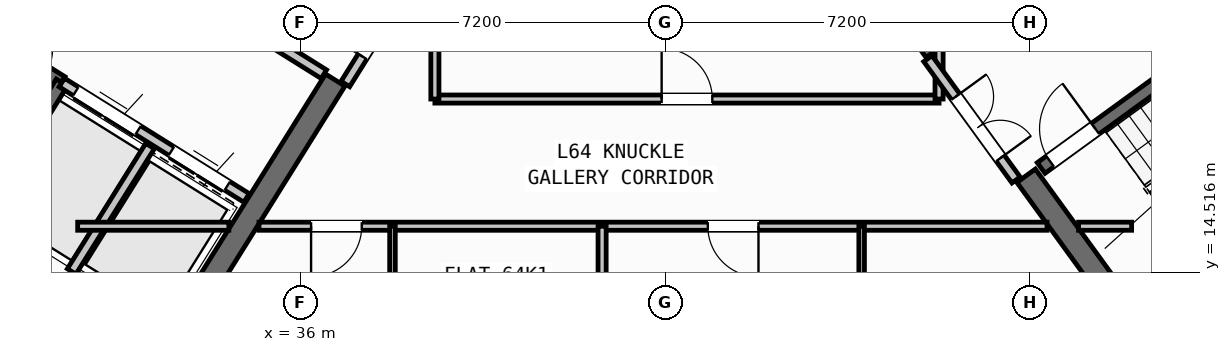
"""IFC4 building model, lengths in metres.
Left out: names, types, materials, properties, quantities, classifications, styles, units other than length and angle.
Written with IfcOpenShell. Run it as: python <this file> out.ifc"""

import sys

from ifc_helpers import new_model, si_unit, direction, frame, frame_2d, origin, place, context, subcontext, project, spatial, rectangle, extrude, source, transform, mapped, element, fill, save


model = new_model("IFC4")
c1 = context("Model", 3, precision=1e-05, world=origin(), true_north=direction((0.0, 1.0)))
c2 = subcontext(c1, "Body", "Model", "MODEL_VIEW")
j1 = project(units=[si_unit("LENGTHUNIT", "METRE"), si_unit("PLANEANGLEUNIT", "RADIAN")], contexts=[c1])
p1 = place(None, origin())
s1 = spatial("IfcSite", under=j1, at=p1, CompositionType="ELEMENT")
p2 = place(p1, origin())
s2 = spatial("IfcBuilding", under=s1, at=p2, CompositionType="ELEMENT")
p3 = place(p2, frame((0.0, 0.0, 254.7)))
s3 = spatial("IfcBuildingStorey", under=s2, at=p3, CompositionType="ELEMENT", Elevation=254.7)
p4 = place(p3, frame((33.324, 12.503, 0.0), z_axis=(0.0, 0.0, 1.0), x_axis=(-0.848043529849, 0.529926571782, 0.0)))
e1 = element("IfcWall", 1, at=p4, inside=s3, PredefinedType="SHEAR", context=c2, shape_type="SweptSolid", body=[
    extrude(rectangle(XDim=13.04, YDim=0.45, at=frame_2d((6.52, 0.0))), origin(), (0.0, 0.0, 1.0), 4.25),
])
p5 = place(p3, frame((36.683, 18.304, 0.0), z_axis=(0.0, 0.0, 1.0), x_axis=(-0.529904039071, -0.848057609704, 0.0)))
e2 = element("IfcWall", 2, at=p5, inside=s3, PredefinedType="SHEAR", context=c2, shape_type="SweptSolid", body=[
    extrude(rectangle(XDim=6.475, YDim=0.45, at=frame_2d((3.238, 0.0))), origin(), (0.0, 0.0, 1.0), 4.25),
])
p6 = place(p3, frame((52.399, 13.169, 0.0), z_axis=(0.0, 0.0, 1.0), x_axis=(0.809022352778, 0.587777877013, 0.0)))
e3 = element("IfcWall", 3, at=p6, inside=s3, PredefinedType="SHEAR", context=c2, shape_type="SweptSolid", body=[
    extrude(rectangle(XDim=12.24, YDim=0.45, at=frame_2d((6.12, 0.0))), origin(), (0.0, 0.0, 1.0), 4.25),
])
p7 = place(p3, frame((52.449, 13.483, 0.0), z_axis=(0.0, 0.0, 1.0), x_axis=(-0.587819244441, 0.808992296542, 0.0)))
e4 = element("IfcWall", 4, at=p7, inside=s3, PredefinedType="SHEAR", context=c2, shape_type="SweptSolid", body=[
    extrude(rectangle(XDim=3.625, YDim=0.45, at=frame_2d((1.812, 0.0))), origin(), (0.0, 0.0, 1.0), 4.25),
])
p8 = place(p3, frame((48.526, 18.884, 0.0), z_axis=(0.0, 0.0, 1.0), x_axis=(-0.587774812919, 0.809024578921, 0.0)))
e5 = element("IfcWall", 5, at=p8, inside=s3, PredefinedType="SHEAR", context=c2, shape_type="SweptSolid", body=[
    extrude(rectangle(XDim=6.475, YDim=0.45, at=frame_2d((3.238, 0.0))), origin(), (0.0, 0.0, 1.0), 4.25),
])
p9 = place(p3, frame((31.28, 18.261, 0.0), z_axis=(0.0, 0.0, 1.0), x_axis=(-0.848051618787, 0.529913626805, 0.0)))
e6 = element("IfcWall", 6, at=p9, inside=s3, PredefinedType="SHEAR", context=c2, shape_type="SweptSolid", body=[
    extrude(rectangle(XDim=7.46, YDim=0.26, at=frame_2d((3.73, 0.0))), origin(), (0.0, 0.0, 1.0), 4.25),
])
p10 = place(p9, frame((0.36, 0.0, 0.0)))
e7 = element("IfcOpeningElement", 7, at=p10, cuts=e6, PredefinedType="OPENING", context=c2, shape_type="SweptSolid", body=[
    extrude(rectangle(XDim=0.86, YDim=2.05, at=frame_2d((0.43, 1.025))), frame((0.0, 0.14, 0.0), z_axis=(0.0, -1.0, 0.0), x_axis=(1.0, 0.0, 0.0)), (0.0, 0.0, 1.0), 0.28),
])
p11 = place(p3, frame((31.288, 18.256, 0.0), z_axis=(0.0, 0.0, 1.0), x_axis=(-0.529943379326, -0.848033026897, 0.0)))
e8 = element("IfcWall", 8, at=p11, inside=s3, PredefinedType="SHEAR", context=c2, shape_type="SweptSolid", body=[
    extrude(rectangle(XDim=3.16, YDim=0.26, at=frame_2d((1.58, 0.0))), origin(), (0.0, 0.0, 1.0), 4.25),
])
p12 = place(p3, frame((34.933, 15.978, 0.0), z_axis=(0.0, 0.0, 1.0), x_axis=(-0.848055739377, 0.529907032327, 0.0)))
e9 = element("IfcWall", 9, at=p12, inside=s3, PredefinedType="STANDARD", context=c2, shape_type="SweptSolid", body=[
    extrude(rectangle(XDim=4.298, YDim=0.2, at=frame_2d((2.149, 0.0))), origin(), (0.0, 0.0, 1.0), 4.24),
])
p13 = place(p12, frame((0.448, 0.0, 0.0)))
e10 = element("IfcOpeningElement", 10, at=p13, cuts=e9, PredefinedType="OPENING", context=c2, shape_type="SweptSolid", body=[
    extrude(rectangle(XDim=1.3, YDim=2.2, at=frame_2d((0.65, 1.1))), frame((0.0, 0.11, 0.0), z_axis=(0.0, -1.0, 0.0), x_axis=(1.0, 0.0, 0.0)), (0.0, 0.0, 1.0), 0.22),
])
p14 = place(p12, frame((2.523, 0.0, 0.0)))
e11 = element("IfcOpeningElement", 11, at=p14, cuts=e9, PredefinedType="OPENING", context=c2, shape_type="SweptSolid", body=[
    extrude(rectangle(XDim=1.45, YDim=2.25, at=frame_2d((0.725, 1.125))), frame((0.0, 0.11, 0.0), z_axis=(0.0, -1.0, 0.0), x_axis=(1.0, 0.0, 0.0)), (0.0, 0.0, 1.0), 0.22),
])
p15 = place(p3, frame((36.459, 18.421, 0.0), z_axis=(0.0, 0.0, 1.0), x_axis=(-0.848059591691, 0.529900867089, 0.0)))
e12 = element("IfcWall", 12, at=p15, inside=s3, PredefinedType="STANDARD", context=c2, shape_type="SweptSolid", body=[
    extrude(rectangle(XDim=5.818, YDim=0.2, at=frame_2d((2.909, 0.0))), origin(), (0.0, 0.0, 1.0), 4.24),
])
p16 = place(p15, frame((2.598, 0.0, 0.0)))
e13 = element("IfcOpeningElement", 13, at=p16, cuts=e12, PredefinedType="OPENING", context=c2, shape_type="SweptSolid", body=[
    extrude(rectangle(XDim=1.15, YDim=2.1, at=frame_2d((0.575, 1.05))), frame((0.0, 0.11, 0.0), z_axis=(0.0, -1.0, 0.0), x_axis=(1.0, 0.0, 0.0)), (0.0, 0.0, 1.0), 0.22),
])
p17 = place(p3, frame((33.029, 17.003, 0.0), z_axis=(0.0, 0.0, 1.0), x_axis=(-0.529916267533, -0.848049968695, 0.0)))
e14 = element("IfcWall", 14, at=p17, inside=s3, PredefinedType="STANDARD", context=c2, shape_type="SweptSolid", body=[
    extrude(rectangle(XDim=2.92, YDim=0.2, at=frame_2d((1.46, 0.0))), origin(), (0.0, 0.0, 1.0), 4.24),
])
p18 = place(p3, frame((52.472, 14.013, 0.0), z_axis=(0.0, 0.0, 1.0), x_axis=(0.809028366311, 0.587769599847, 0.0)))
e15 = element("IfcWall", 15, at=p18, inside=s3, PredefinedType="SHEAR", context=c2, shape_type="SweptSolid", body=[
    extrude(rectangle(XDim=7.33, YDim=0.26, at=frame_2d((3.665, 0.0))), origin(), (0.0, 0.0, 1.0), 4.25),
])
p19 = place(p3, frame((50.615, 16.57, 0.0), z_axis=(0.0, 0.0, 1.0), x_axis=(0.809028366311, 0.587769599847, 0.0)))
e16 = element("IfcWall", 16, at=p19, inside=s3, PredefinedType="SHEAR", context=c2, shape_type="SweptSolid", body=[
    extrude(rectangle(XDim=7.33, YDim=0.26, at=frame_2d((3.665, 0.0))), origin(), (0.0, 0.0, 1.0), 4.25),
])
p20 = place(p19, frame((0.22, 0.0, 0.0)))
e17 = element("IfcOpeningElement", 17, at=p20, cuts=e16, PredefinedType="OPENING", context=c2, shape_type="SweptSolid", body=[
    extrude(rectangle(XDim=1.1, YDim=2.1, at=frame_2d((0.55, 1.05))), frame((0.0, 0.14, 0.0), z_axis=(0.0, -1.0, 0.0), x_axis=(1.0, 0.0, 0.0)), (0.0, 0.0, 1.0), 0.28),
])
p21 = place(p3, frame((32.164, 10.374, 0.0), z_axis=(0.0, 0.0, 1.0), x_axis=(-0.848044107957, 0.529925646633, 0.0)))
e18 = element("IfcWall", 18, at=p21, inside=s3, PredefinedType="PARTITIONING", context=c2, shape_type="SweptSolid", body=[
    extrude(rectangle(XDim=15.57, YDim=0.16, at=frame_2d((7.785, 0.0))), origin(), (0.0, 0.0, 1.0), 4.24),
])
p22 = place(p21, frame((0.85, 0.0, 0.0)))
e19 = element("IfcOpeningElement", 19, at=p22, cuts=e18, PredefinedType="OPENING", context=c2, shape_type="SweptSolid", body=[
    extrude(rectangle(XDim=0.86, YDim=2.05, at=frame_2d((0.43, 1.025))), frame((0.0, 0.09, 0.0), z_axis=(0.0, -1.0, 0.0), x_axis=(1.0, 0.0, 0.0)), (0.0, 0.0, 1.0), 0.18),
])
p23 = place(p21, frame((3.87, 0.0, 0.0)))
e20 = element("IfcOpeningElement", 20, at=p23, cuts=e18, PredefinedType="OPENING", context=c2, shape_type="SweptSolid", body=[
    extrude(rectangle(XDim=0.86, YDim=2.05, at=frame_2d((0.43, 1.025))), frame((0.0, 0.09, 0.0), z_axis=(0.0, -1.0, 0.0), x_axis=(1.0, 0.0, 0.0)), (0.0, 0.0, 1.0), 0.18),
])
p24 = place(p21, frame((6.33, 0.0, 0.0)))
e21 = element("IfcOpeningElement", 21, at=p24, cuts=e18, PredefinedType="OPENING", context=c2, shape_type="SweptSolid", body=[
    extrude(rectangle(XDim=0.78, YDim=2.05, at=frame_2d((0.39, 1.025))), frame((0.0, 0.09, 0.0), z_axis=(0.0, -1.0, 0.0), x_axis=(1.0, 0.0, 0.0)), (0.0, 0.0, 1.0), 0.18),
])
p25 = place(p21, frame((8.78, 0.0, 0.0)))
e22 = element("IfcOpeningElement", 22, at=p25, cuts=e18, PredefinedType="OPENING", context=c2, shape_type="SweptSolid", body=[
    extrude(rectangle(XDim=0.78, YDim=2.05, at=frame_2d((0.39, 1.025))), frame((0.0, 0.09, 0.0), z_axis=(0.0, -1.0, 0.0), x_axis=(1.0, 0.0, 0.0)), (0.0, 0.0, 1.0), 0.18),
])
p26 = place(p21, frame((11.18, 0.0, 0.0)))
e23 = element("IfcOpeningElement", 23, at=p26, cuts=e18, PredefinedType="OPENING", context=c2, shape_type="SweptSolid", body=[
    extrude(rectangle(XDim=0.78, YDim=2.05, at=frame_2d((0.39, 1.025))), frame((0.0, 0.09, 0.0), z_axis=(0.0, -1.0, 0.0), x_axis=(1.0, 0.0, 0.0)), (0.0, 0.0, 1.0), 0.18),
])
p27 = place(p3, frame((38.451, 20.737, 0.0), z_axis=(0.0, 0.0, 1.0), x_axis=(-0.529924799939, -0.848044637038, 0.0)))
e24 = element("IfcWall", 24, at=p27, inside=s3, PredefinedType="STANDARD", context=c2, shape_type="SweptSolid", body=[
    extrude(rectangle(XDim=2.96, YDim=0.2, at=frame_2d((1.48, 0.0))), origin(), (0.0, 0.0, 1.0), 4.24),
])
p28 = place(p27, frame((1.46, 0.0, 0.0)))
e25 = element("IfcOpeningElement", 25, at=p28, cuts=e24, PredefinedType="OPENING", context=c2, shape_type="SweptSolid", body=[
    extrude(rectangle(XDim=0.86, YDim=2.05, at=frame_2d((0.43, 1.025))), frame((0.0, 0.11, 0.0), z_axis=(0.0, -1.0, 0.0), x_axis=(1.0, 0.0, 0.0)), (0.0, 0.0, 1.0), 0.22),
])
p29 = place(p3, frame((31.6, 15.42, 0.0), z_axis=(0.0, 0.0, 1.0), x_axis=(1.0, 0.0, 0.0)))
e26 = element("IfcWall", 26, at=p29, inside=s3, PredefinedType="PARTITIONING", context=c2, shape_type="SweptSolid", body=[
    extrude(rectangle(XDim=2.984, YDim=0.16, at=frame_2d((1.492, 0.0))), origin(), (0.0, 0.0, 1.0), 4.24),
])
p30 = place(p3, frame((35.178, 15.42, 0.0), z_axis=(0.0, 0.0, 1.0), x_axis=(1.0, 0.0, 0.0)))
e27 = element("IfcWall", 27, at=p30, inside=s3, PredefinedType="PARTITIONING", context=c2, shape_type="SweptSolid", body=[
    extrude(rectangle(XDim=15.552, YDim=0.16, at=frame_2d((7.776, 0.0))), origin(), (0.0, 0.0, 1.0), 4.24),
])
p31 = place(p30, frame((1.028, 0.0, 0.0)))
e28 = element("IfcOpeningElement", 28, at=p31, cuts=e27, PredefinedType="OPENING", context=c2, shape_type="SweptSolid", body=[
    extrude(rectangle(XDim=1.0, YDim=2.1, at=frame_2d((0.5, 1.05))), frame((0.0, 0.09, 0.0), z_axis=(0.0, -1.0, 0.0), x_axis=(1.0, 0.0, 0.0)), (0.0, 0.0, 1.0), 0.18),
])
p32 = place(p30, frame((8.858, 0.0, 0.0)))
e29 = element("IfcOpeningElement", 29, at=p32, cuts=e27, PredefinedType="OPENING", context=c2, shape_type="SweptSolid", body=[
    extrude(rectangle(XDim=1.0, YDim=2.1, at=frame_2d((0.5, 1.05))), frame((0.0, 0.09, 0.0), z_axis=(0.0, -1.0, 0.0), x_axis=(1.0, 0.0, 0.0)), (0.0, 0.0, 1.0), 0.18),
])
p33 = place(p3, frame((51.354, 15.42, 0.0), z_axis=(0.0, 0.0, 1.0), x_axis=(1.0, 0.0, 0.0)))
e30 = element("IfcWall", 30, at=p33, inside=s3, PredefinedType="PARTITIONING", context=c2, shape_type="SweptSolid", body=[
    extrude(rectangle(XDim=1.046, YDim=0.16, at=frame_2d((0.523, 0.0))), origin(), (0.0, 0.0, 1.0), 4.24),
])
p34 = place(p3, frame((38.65, 17.93, 0.0), z_axis=(0.0, 0.0, 1.0), x_axis=(1.0, 0.0, 0.0)))
e31 = element("IfcWall", 31, at=p34, inside=s3, PredefinedType="PARTITIONING", context=c2, shape_type="SweptSolid", body=[
    extrude(rectangle(XDim=9.95, YDim=0.16, at=frame_2d((4.975, 0.0))), origin(), (0.0, 0.0, 1.0), 4.24),
])
p35 = place(p34, frame((4.475, 0.0, 0.0)))
e32 = element("IfcOpeningElement", 32, at=p35, cuts=e31, PredefinedType="OPENING", context=c2, shape_type="SweptSolid", body=[
    extrude(rectangle(XDim=1.0, YDim=2.1, at=frame_2d((0.5, 1.05))), frame((0.0, 0.09, 0.0), z_axis=(0.0, -1.0, 0.0), x_axis=(1.0, 0.0, 0.0)), (0.0, 0.0, 1.0), 0.18),
])
p36 = place(p3, frame((38.65, 17.93, 0.0), z_axis=(0.0, 0.0, 1.0), x_axis=(0.0, 1.0, 0.0)))
e33 = element("IfcWall", 33, at=p36, inside=s3, PredefinedType="PARTITIONING", context=c2, shape_type="SweptSolid", body=[
    extrude(rectangle(XDim=3.046, YDim=0.16, at=frame_2d((1.523, 0.0))), origin(), (0.0, 0.0, 1.0), 4.24),
])
p37 = place(p3, frame((48.6, 17.93, 0.0), z_axis=(0.0, 0.0, 1.0), x_axis=(0.0, 1.0, 0.0)))
e34 = element("IfcWall", 34, at=p37, inside=s3, PredefinedType="PARTITIONING", context=c2, shape_type="SweptSolid", body=[
    extrude(rectangle(XDim=0.993, YDim=0.16, at=frame_2d((0.496, 0.0))), origin(), (0.0, 0.0, 1.0), 4.24),
])
p38 = place(p3, frame((50.119, 16.333, 0.0), z_axis=(0.0, 0.0, 1.0), x_axis=(-0.587749856981, 0.809042709391, 0.0)))
e35 = element("IfcWall", 35, at=p38, inside=s3, PredefinedType="STANDARD", context=c2, shape_type="SweptSolid", body=[
    extrude(rectangle(XDim=2.96, YDim=0.2, at=frame_2d((1.48, 0.0))), origin(), (0.0, 0.0, 1.0), 4.24),
])
p39 = place(p38, frame((0.53, 0.0, 0.0)))
e36 = element("IfcOpeningElement", 36, at=p39, cuts=e35, PredefinedType="OPENING", context=c2, shape_type="SweptSolid", body=[
    extrude(rectangle(XDim=1.5, YDim=2.15, at=frame_2d((0.75, 1.075))), frame((0.0, 0.11, 0.0), z_axis=(0.0, -1.0, 0.0), x_axis=(1.0, 0.0, 0.0)), (0.0, 0.0, 1.0), 0.22),
])
p40 = place(p3, frame((41.95, 1.96, 0.0), z_axis=(0.0, 0.0, 1.0), x_axis=(0.0, 1.0, 0.0)))
e37 = element("IfcWall", 37, at=p40, inside=s3, PredefinedType="PARTITIONING", context=c2, shape_type="SweptSolid", body=[
    extrude(rectangle(XDim=13.46, YDim=0.16, at=frame_2d((6.73, 0.0))), origin(), (0.0, 0.0, 1.0), 4.24),
])
p41 = place(p3, frame((37.813, 1.96, 0.0), z_axis=(0.0, 0.0, 1.0), x_axis=(0.0, 1.0, 0.0)))
e38 = element("IfcWall", 38, at=p41, inside=s3, PredefinedType="PARTITIONING", context=c2, shape_type="SweptSolid", body=[
    extrude(rectangle(XDim=13.46, YDim=0.11, at=frame_2d((6.73, 0.0))), origin(), (0.0, 0.0, 1.0), 4.24),
])
p42 = place(p41, frame((5.5, 0.0, 0.0)))
e39 = element("IfcOpeningElement", 39, at=p42, cuts=e38, PredefinedType="OPENING", context=c2, shape_type="SweptSolid", body=[
    extrude(rectangle(XDim=0.92, YDim=2.08, at=frame_2d((0.46, 1.04))), frame((0.0, 0.065, 0.0), z_axis=(0.0, -1.0, 0.0), x_axis=(1.0, 0.0, 0.0)), (0.0, 0.0, 1.0), 0.13),
])
p43 = place(p41, frame((10.67, 0.0, 0.0)))
e40 = element("IfcOpeningElement", 40, at=p43, cuts=e38, PredefinedType="OPENING", context=c2, shape_type="SweptSolid", body=[
    extrude(rectangle(XDim=0.88, YDim=2.08, at=frame_2d((0.44, 1.04))), frame((0.0, 0.065, 0.0), z_axis=(0.0, -1.0, 0.0), x_axis=(1.0, 0.0, 0.0)), (0.0, 0.0, 1.0), 0.13),
])
p44 = place(p3, frame((47.072, 1.96, 0.0), z_axis=(0.0, 0.0, 1.0), x_axis=(0.0, 1.0, 0.0)))
e41 = element("IfcWall", 41, at=p44, inside=s3, PredefinedType="PARTITIONING", context=c2, shape_type="SweptSolid", body=[
    extrude(rectangle(XDim=13.46, YDim=0.11, at=frame_2d((6.73, 0.0))), origin(), (0.0, 0.0, 1.0), 4.24),
])
p45 = place(p44, frame((6.6, 0.0, 0.0)))
e42 = element("IfcOpeningElement", 42, at=p45, cuts=e41, PredefinedType="OPENING", context=c2, shape_type="SweptSolid", body=[
    extrude(rectangle(XDim=0.92, YDim=2.08, at=frame_2d((0.46, 1.04))), frame((0.0, 0.065, 0.0), z_axis=(0.0, -1.0, 0.0), x_axis=(1.0, 0.0, 0.0)), (0.0, 0.0, 1.0), 0.13),
])
p46 = place(p44, frame((11.32, 0.0, 0.0)))
e43 = element("IfcOpeningElement", 43, at=p46, cuts=e41, PredefinedType="OPENING", context=c2, shape_type="SweptSolid", body=[
    extrude(rectangle(XDim=0.88, YDim=2.08, at=frame_2d((0.44, 1.04))), frame((0.0, 0.065, 0.0), z_axis=(0.0, -1.0, 0.0), x_axis=(1.0, 0.0, 0.0)), (0.0, 0.0, 1.0), 0.13),
])
m1 = source(origin(), c2, "Body", "SweptSolid", [
    extrude(rectangle(XDim=1.3, YDim=2.2, at=frame_2d((0.65, 1.1))), frame((0.0, 0.025, 0.0), z_axis=(0.0, -1.0, 0.0), x_axis=(1.0, 0.0, 0.0)), (0.0, 0.0, 1.0), 0.05),
])
p47 = place(p13, origin())
e44 = element("IfcDoor", 44, at=p47, inside=s3, OperationType="DOUBLE_DOOR_SLIDING", PredefinedType="DOOR", context=c2, shape_type="MappedRepresentation", body=[
    mapped(m1, transform((0.0, 0.0, 0.0), scale=1.0)),
])
fill(e10, e44)
m2 = source(origin(), c2, "Body", "SweptSolid", [
    extrude(rectangle(XDim=1.45, YDim=2.25, at=frame_2d((0.725, 1.125))), frame((0.0, 0.025, 0.0), z_axis=(0.0, -1.0, 0.0), x_axis=(1.0, 0.0, 0.0)), (0.0, 0.0, 1.0), 0.05),
])
p48 = place(p14, origin())
e45 = element("IfcDoor", 45, at=p48, inside=s3, OperationType="DOUBLE_DOOR_SLIDING", PredefinedType="DOOR", context=c2, shape_type="MappedRepresentation", body=[
    mapped(m2, transform((0.0, 0.0, 0.0), scale=1.0)),
])
fill(e11, e45)
m3 = source(origin(), c2, "Body", "SweptSolid", [
    extrude(rectangle(XDim=1.1, YDim=2.1, at=frame_2d((0.55, 1.05))), frame((0.0, 0.025, 0.0), z_axis=(0.0, -1.0, 0.0), x_axis=(1.0, 0.0, 0.0)), (0.0, 0.0, 1.0), 0.05),
])
p49 = place(p20, origin())
e46 = element("IfcDoor", 46, at=p49, inside=s3, OperationType="SINGLE_SWING_RIGHT", PredefinedType="DOOR", context=c2, shape_type="MappedRepresentation", body=[
    mapped(m3, transform((0.0, 0.0, 0.0), scale=1.0)),
])
fill(e17, e46)
m4 = source(origin(), c2, "Body", "SweptSolid", [
    extrude(rectangle(XDim=1.0, YDim=2.1, at=frame_2d((0.5, 1.05))), frame((0.0, 0.025, 0.0), z_axis=(0.0, -1.0, 0.0), x_axis=(1.0, 0.0, 0.0)), (0.0, 0.0, 1.0), 0.05),
])
p50 = place(p35, origin())
e47 = element("IfcDoor", 47, at=p50, inside=s3, OperationType="SINGLE_SWING_LEFT", PredefinedType="DOOR", context=c2, shape_type="MappedRepresentation", body=[
    mapped(m4, transform((0.0, 0.0, 0.0), scale=1.0)),
])
fill(e32, e47)
m5 = source(origin(), c2, "Body", "SweptSolid", [
    extrude(rectangle(XDim=0.86, YDim=2.05, at=frame_2d((0.43, 1.025))), frame((0.0, 0.025, 0.0), z_axis=(0.0, -1.0, 0.0), x_axis=(1.0, 0.0, 0.0)), (0.0, 0.0, 1.0), 0.05),
])
p51 = place(p28, frame((0.86, 0.0, 0.0), z_axis=(0.0, 0.0, 1.0), x_axis=(-1.0, 0.0, 0.0)))
e48 = element("IfcDoor", 48, at=p51, inside=s3, OperationType="SINGLE_SWING_LEFT", PredefinedType="DOOR", context=c2, shape_type="MappedRepresentation", body=[
    mapped(m5, transform((0.0, 0.0, 0.0), scale=1.0)),
])
fill(e25, e48)
m6 = source(origin(), c2, "Body", "SweptSolid", [
    extrude(rectangle(XDim=1.5, YDim=2.15, at=frame_2d((0.75, 1.075))), frame((0.0, 0.025, 0.0), z_axis=(0.0, -1.0, 0.0), x_axis=(1.0, 0.0, 0.0)), (0.0, 0.0, 1.0), 0.05),
])
p52 = place(p39, frame((1.5, 0.0, 0.0), z_axis=(0.0, 0.0, 1.0), x_axis=(-1.0, 0.0, 0.0)))
e49 = element("IfcDoor", 49, at=p52, inside=s3, OperationType="DOUBLE_DOOR_SINGLE_SWING", PredefinedType="DOOR", context=c2, shape_type="MappedRepresentation", body=[
    mapped(m6, transform((0.0, 0.0, 0.0), scale=1.0)),
])
fill(e36, e49)
p53 = place(p31, frame((1.0, 0.0, 0.0), z_axis=(0.0, 0.0, 1.0), x_axis=(-1.0, 0.0, 0.0)))
e50 = element("IfcDoor", 50, at=p53, inside=s3, OperationType="SINGLE_SWING_RIGHT", PredefinedType="DOOR", context=c2, shape_type="MappedRepresentation", body=[
    mapped(m4, transform((0.0, 0.0, 0.0), scale=1.0)),
])
fill(e28, e50)
p54 = place(p32, frame((1.0, 0.0, 0.0), z_axis=(0.0, 0.0, 1.0), x_axis=(-1.0, 0.0, 0.0)))
e51 = element("IfcDoor", 51, at=p54, inside=s3, OperationType="SINGLE_SWING_LEFT", PredefinedType="DOOR", context=c2, shape_type="MappedRepresentation", body=[
    mapped(m4, transform((0.0, 0.0, 0.0), scale=1.0)),
])
fill(e29, e51)
save(model, sys.argv[1])
